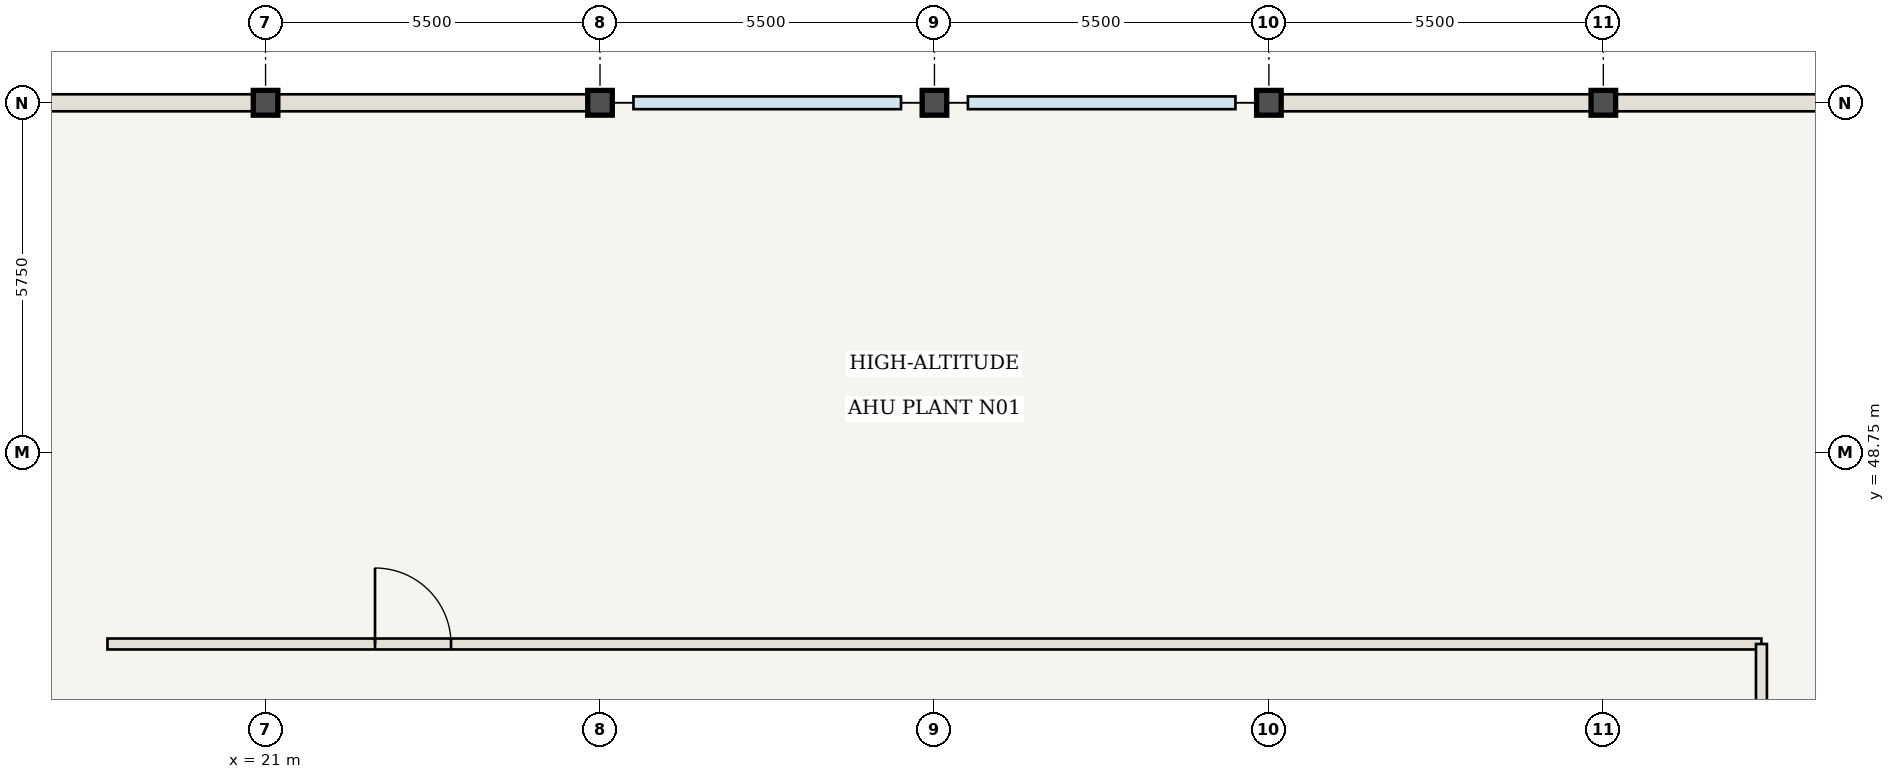
"""IFC4 building model, lengths in metres.
Left out: names, types, materials, properties, quantities, classifications, styles, units other than length and angle.
Written with IfcOpenShell. Run it as: python <this file> out.ifc"""

import sys

from ifc_helpers import new_model, si_unit, direction, frame, frame_2d, origin, origin_2d, place, context, subcontext, project, spatial, rectangle, i_section, extrude, element, fill, save


model = new_model("IFC4")
c1 = context("Model", 3, precision=1e-05, world=origin(), true_north=direction((0.0, 1.0)))
c2 = subcontext(c1, "Body", "Model", "MODEL_VIEW")
j1 = project(units=[si_unit("LENGTHUNIT", "METRE"), si_unit("PLANEANGLEUNIT", "RADIAN")], contexts=[c1])
p1 = place(None, origin())
s1 = spatial("IfcSite", under=j1, at=p1, CompositionType="ELEMENT")
p2 = place(p1, origin())
s2 = spatial("IfcBuilding", under=s1, at=p2, CompositionType="ELEMENT")
p3 = place(p2, frame((0.0, 0.0, 322.35)))
s3 = spatial("IfcBuildingStorey", under=s2, at=p3, CompositionType="ELEMENT", Elevation=322.35)
for number, where, z_axis, x_axis in (
    (1, (21.0, 54.5, 0.0), (0.0, 0.0, 1.0), (1.0, 0.0, 0.0)),
    (2, (26.5, 54.5, 0.0), (0.0, 0.0, 1.0), (1.0, 0.0, 0.0)),
    (3, (32.0, 54.5, 0.0), (0.0, 0.0, 1.0), (1.0, 0.0, 0.0)),
    (4, (37.5, 54.5, 0.0), (0.0, 0.0, 1.0), (1.0, 0.0, 0.0)),
    (5, (43.0, 54.5, 0.0), (0.0, 0.0, 1.0), (1.0, 0.0, 0.0)),
):
    element("IfcColumn", number, at=place(p3, frame(where, z_axis=z_axis, x_axis=x_axis)), inside=s3, PredefinedType="COLUMN", context=c2, shape_type="SweptSolid", body=[
        extrude(i_section(OverallWidth=0.404, OverallDepth=0.407, WebThickness=0.027, FlangeThickness=0.044, at=origin_2d()), origin(), (0.0, 0.0, 1.0), 4.55),
    ])
p4 = place(p3, frame((18.4, 45.6, 0.0), z_axis=(0.0, 0.0, 1.0), x_axis=(1.0, 0.0, 0.0)))
e6 = element("IfcWall", 6, at=p4, inside=s3, PredefinedType="STANDARD", context=c2, shape_type="SweptSolid", body=[
    extrude(rectangle(XDim=27.2, YDim=0.18, at=frame_2d((13.6, 0.0))), origin(), (0.0, 0.0, 1.0), 4.29),
])
p5 = place(p4, frame((4.4, 0.0, 0.0)))
e7 = element("IfcOpeningElement", 7, at=p5, cuts=e6, PredefinedType="OPENING", context=c2, shape_type="SweptSolid", body=[
    extrude(rectangle(XDim=1.25, YDim=2.2, at=frame_2d((0.625, 1.1))), frame((0.0, 0.1, 0.0), z_axis=(0.0, -1.0, 0.0), x_axis=(1.0, 0.0, 0.0)), (0.0, 0.0, 1.0), 0.2),
])
p6 = place(p3, frame((45.6, 18.4, 0.0), z_axis=(0.0, 0.0, 1.0), x_axis=(0.0, 1.0, 0.0)))
e8 = element("IfcWall", 8, at=p6, inside=s3, PredefinedType="STANDARD", context=c2, shape_type="SweptSolid", body=[
    extrude(rectangle(XDim=27.2, YDim=0.18, at=frame_2d((13.6, 0.0))), origin(), (0.0, 0.0, 1.0), 4.29),
])
p7 = place(p6, frame((14.55, 0.0, 0.0)))
e9 = element("IfcOpeningElement", 9, at=p7, cuts=e8, PredefinedType="OPENING", context=c2, shape_type="SweptSolid", body=[
    extrude(rectangle(XDim=1.25, YDim=2.2, at=frame_2d((0.625, 1.1))), frame((0.0, 0.1, 0.0), z_axis=(0.0, -1.0, 0.0), x_axis=(1.0, 0.0, 0.0)), (0.0, 0.0, 1.0), 0.2),
])
for number, where, z_axis, x_axis in (
    (10, (15.5, 54.5, 0.0), (0.0, 0.0, 1.0), (1.0, 0.0, 0.0)),
    (11, (21.0, 54.5, 0.0), (0.0, 0.0, 1.0), (1.0, 0.0, 0.0)),
    (12, (37.5, 54.5, 0.0), (0.0, 0.0, 1.0), (1.0, 0.0, 0.0)),
    (13, (43.0, 54.5, 0.0), (0.0, 0.0, 1.0), (1.0, 0.0, 0.0)),
):
    element("IfcWall", number, at=place(p3, frame(where, z_axis=z_axis, x_axis=x_axis)), inside=s3, PredefinedType="USERDEFINED", context=c2, shape_type="SweptSolid", body=[
        extrude(rectangle(XDim=5.5, YDim=0.28, at=frame_2d((2.75, 0.0))), origin(), (0.0, 0.0, 1.0), 3.57),
    ])
p8 = place(p5, origin())
e14 = element("IfcDoor", 14, at=p8, inside=s3, OperationType="SINGLE_SWING_LEFT", PredefinedType="DOOR", context=c2, shape_type="SweptSolid", body=[
    extrude(rectangle(XDim=1.25, YDim=2.2, at=frame_2d((0.625, 1.1))), frame((0.0, 0.025, 0.0), z_axis=(0.0, -1.0, 0.0), x_axis=(1.0, 0.0, 0.0)), (0.0, 0.0, 1.0), 0.05),
])
fill(e7, e14)
save(model, sys.argv[1])
